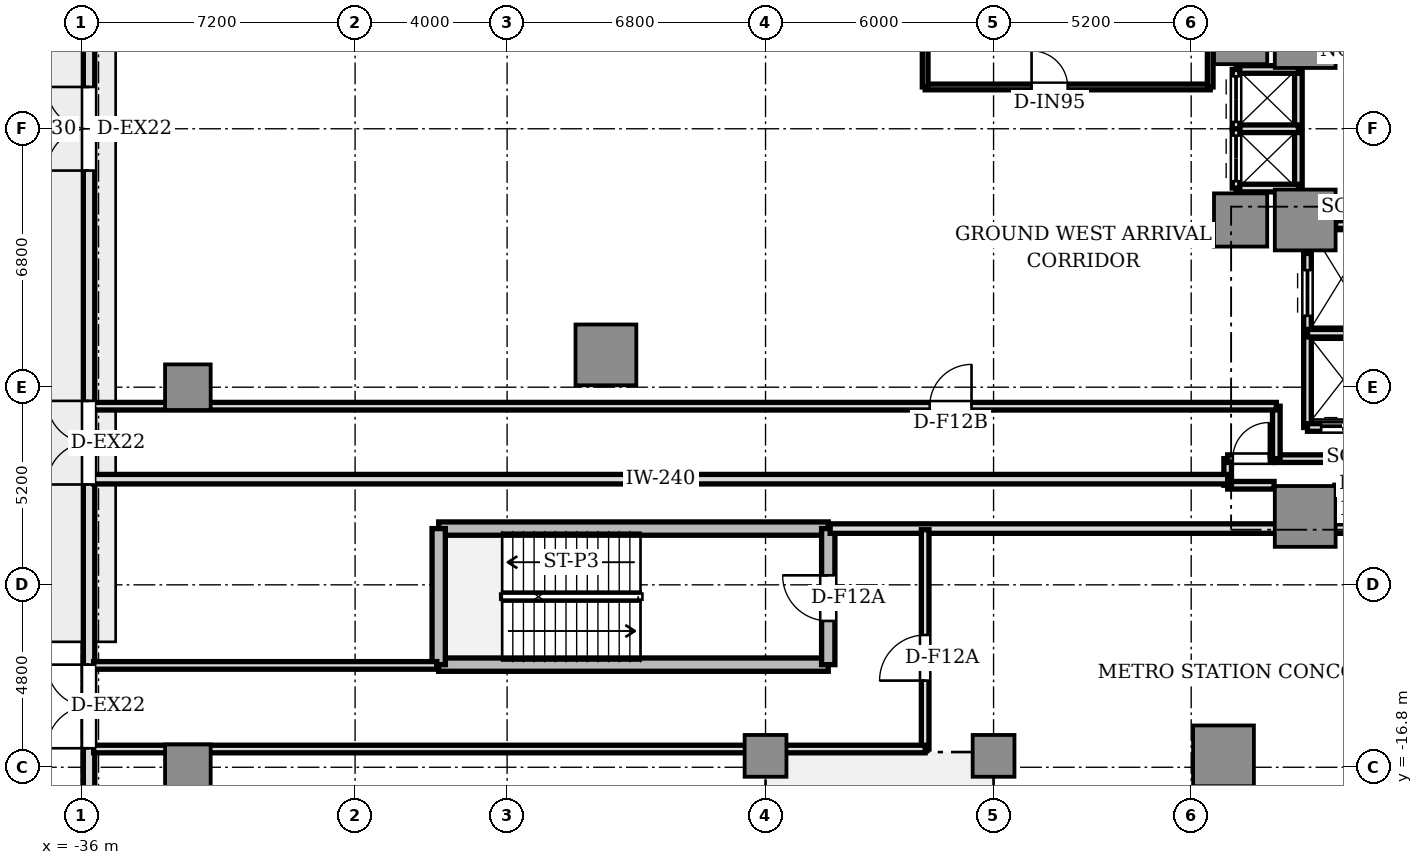
"""IFC4 building model, lengths in metres.
Left out: names, types, materials, properties, quantities, classifications, styles, units other than length and angle.
Written with IfcOpenShell. Run it as: python <this file> out.ifc"""

import sys

from ifc_helpers import new_model, si_unit, direction, frame, frame_2d, origin, origin_2d, place, context, subcontext, project, spatial, rectangle, circle, extrude, source, transform, mapped, element, fill, save


model = new_model("IFC4")
c1 = context("Model", 3, precision=1e-05, world=origin(), true_north=direction((0.0, 1.0)))
c2 = subcontext(c1, "Body", "Model", "MODEL_VIEW")
j1 = project(units=[si_unit("LENGTHUNIT", "METRE"), si_unit("PLANEANGLEUNIT", "RADIAN")], contexts=[c1])
p1 = place(None, origin())
s1 = spatial("IfcSite", under=j1, at=p1, CompositionType="ELEMENT")
p2 = place(p1, origin())
s2 = spatial("IfcBuilding", under=s1, at=p2, CompositionType="ELEMENT")
p3 = place(p2, origin())
s3 = spatial("IfcBuildingStorey", under=s2, at=p3, CompositionType="ELEMENT", Elevation=0.0)
p4 = place(p3, frame((-3.55, -10.2, 0.0), z_axis=(0.0, 0.0, 1.0), x_axis=(1.0, 0.0, 0.0)))
e1 = element("IfcWall", 1, at=p4, inside=s3, PredefinedType="SHEAR", context=c2, shape_type="SweptSolid", body=[
    extrude(rectangle(XDim=7.1, YDim=0.5, at=frame_2d((3.55, 0.0))), origin(), (0.0, 0.0, 1.0), 4.48),
])
m1 = source(origin(), c2, "Body", "SweptSolid", [
    extrude(rectangle(XDim=1.6, YDim=1.6, at=origin_2d()), origin(), (0.0, 0.0, 1.0), 4.48),
])
for number, where, z_axis, x_axis in (
    (2, (-3.8, 2.4, 0.0), (0.0, 0.0, 1.0), (1.0, 0.0, 0.0)),
    (3, (-3.8, -2.4, 0.0), (0.0, 0.0, 1.0), (1.0, 0.0, 0.0)),
    (4, (-3.8, -10.2, 0.0), (0.0, 0.0, 1.0), (1.0, 0.0, 0.0)),
):
    element("IfcColumn", number, at=place(p3, frame(where, z_axis=z_axis, x_axis=x_axis)), inside=s3, PredefinedType="COLUMN", context=c2, shape_type="MappedRepresentation", body=[
        mapped(m1, transform((0.0, 0.0, 0.0), scale=1.0)),
    ])
m2 = source(origin(), c2, "Body", "SweptSolid", [
    extrude(rectangle(XDim=1.4, YDim=1.4, at=origin_2d()), origin(), (0.0, 0.0, 1.0), 4.48),
])
for number, where, z_axis, x_axis in (
    (5, (-5.5, 2.4, 0.0), (0.0, 0.0, 1.0), (1.0, 0.0, 0.0)),
    (6, (-5.5, -2.4, 0.0), (0.0, 0.0, 1.0), (1.0, 0.0, 0.0)),
):
    element("IfcColumn", number, at=place(p3, frame(where, z_axis=z_axis, x_axis=x_axis)), inside=s3, PredefinedType="COLUMN", context=c2, shape_type="MappedRepresentation", body=[
        mapped(m2, transform((0.0, 0.0, 0.0), scale=1.0)),
    ])
for number, where, z_axis, x_axis in (
    (7, (-22.2, -5.95, 0.0), (0.0, 0.0, 1.0), (1.0, 0.0, 0.0)),
    (8, (-5.95, -16.5, 0.0), (0.0, 0.0, 1.0), (1.0, 0.0, 0.0)),
):
    element("IfcColumn", number, at=place(p3, frame(where, z_axis=z_axis, x_axis=x_axis)), inside=s3, PredefinedType="COLUMN", context=c2, shape_type="MappedRepresentation", body=[
        mapped(m1, transform((0.0, 0.0, 0.0), scale=1.0)),
    ])
m3 = source(origin(), c2, "Body", "SweptSolid", [
    extrude(rectangle(XDim=1.2, YDim=1.2, at=origin_2d()), origin(), (0.0, 0.0, 1.0), 4.48),
])
for number, where, z_axis, x_axis in (
    (9, (-33.2, -16.8, 0.0), (0.0, 0.0, 1.0), (1.0, 0.0, 0.0)),
    (10, (-33.2, -6.8, 0.0), (0.0, 0.0, 1.0), (1.0, 0.0, 0.0)),
):
    element("IfcColumn", number, at=place(p3, frame(where, z_axis=z_axis, x_axis=x_axis)), inside=s3, PredefinedType="COLUMN", context=c2, shape_type="MappedRepresentation", body=[
        mapped(m3, transform((0.0, 0.0, 0.0), scale=1.0)),
    ])
m4 = source(origin(), c2, "Body", "SweptSolid", [
    extrude(circle(Radius=0.55, at=origin_2d()), origin(), (0.0, 0.0, 1.0), 4.48),
])
for number, where, z_axis, x_axis in (
    (11, (-18.0, -16.5, 0.0), (0.0, 0.0, 1.0), (1.0, 0.0, 0.0)),
    (12, (-12.0, -16.5, 0.0), (0.0, 0.0, 1.0), (1.0, 0.0, 0.0)),
):
    element("IfcColumn", number, at=place(p3, frame(where, z_axis=z_axis, x_axis=x_axis)), inside=s3, PredefinedType="COLUMN", context=c2, shape_type="MappedRepresentation", body=[
        mapped(m4, transform((0.0, 0.0, 0.0), scale=1.0)),
    ])
p5 = place(p3, frame((-35.8, -22.6, 0.0), z_axis=(0.0, 0.0, 1.0), x_axis=(0.0, 1.0, 0.0)))
e13 = element("IfcWall", 13, at=p5, inside=s3, PredefinedType="STANDARD", context=c2, shape_type="SweptSolid", body=[
    extrude(rectangle(XDim=45.2, YDim=0.3, at=frame_2d((22.6, 0.0))), origin(), (0.0, 0.0, 1.0), 3.8),
])
p6 = place(p5, frame((6.3, 0.0, 0.0)))
e14 = element("IfcOpeningElement", 14, at=p6, cuts=e13, PredefinedType="OPENING", context=c2, shape_type="SweptSolid", body=[
    extrude(rectangle(XDim=2.2, YDim=2.4, at=frame_2d((1.1, 1.2))), frame((0.0, 0.16, 0.0), z_axis=(0.0, -1.0, 0.0), x_axis=(1.0, 0.0, 0.0)), (0.0, 0.0, 1.0), 0.32),
])
p7 = place(p5, frame((13.24, 0.0, 0.0)))
e15 = element("IfcOpeningElement", 15, at=p7, cuts=e13, PredefinedType="OPENING", context=c2, shape_type="SweptSolid", body=[
    extrude(rectangle(XDim=2.2, YDim=2.4, at=frame_2d((1.1, 1.2))), frame((0.0, 0.16, 0.0), z_axis=(0.0, -1.0, 0.0), x_axis=(1.0, 0.0, 0.0)), (0.0, 0.0, 1.0), 0.32),
])
p8 = place(p5, frame((21.5, 0.0, 0.0)))
e16 = element("IfcOpeningElement", 16, at=p8, cuts=e13, PredefinedType="OPENING", context=c2, shape_type="SweptSolid", body=[
    extrude(rectangle(XDim=2.2, YDim=2.4, at=frame_2d((1.1, 1.2))), frame((0.0, 0.16, 0.0), z_axis=(0.0, -1.0, 0.0), x_axis=(1.0, 0.0, 0.0)), (0.0, 0.0, 1.0), 0.32),
])
p9 = place(p5, frame((32.1, 0.0, 0.0)))
e17 = element("IfcOpeningElement", 17, at=p9, cuts=e13, PredefinedType="OPENING", context=c2, shape_type="SweptSolid", body=[
    extrude(rectangle(XDim=2.2, YDim=2.4, at=frame_2d((1.1, 1.2))), frame((0.0, 0.16, 0.0), z_axis=(0.0, -1.0, 0.0), x_axis=(1.0, 0.0, 0.0)), (0.0, 0.0, 1.0), 0.32),
])
p10 = place(p3, frame((-3.0, -2.52, 0.0), z_axis=(0.0, 0.0, 1.0), x_axis=(1.0, 0.0, 0.0)))
e18 = element("IfcWall", 18, at=p10, inside=s3, PredefinedType="SOLIDWALL", context=c2, shape_type="SweptSolid", body=[
    extrude(rectangle(XDim=1.0, YDim=0.2, at=frame_2d((0.5, 0.0))), origin(), (0.0, 0.0, 1.0), 4.03),
])
p11 = place(p3, frame((-3.74, -5.36, 0.0), z_axis=(0.0, 0.0, 1.0), x_axis=(0.0, 1.0, 0.0)))
e19 = element("IfcWall", 19, at=p11, inside=s3, PredefinedType="SOLIDWALL", context=c2, shape_type="SweptSolid", body=[
    extrude(rectangle(XDim=2.08, YDim=0.2, at=frame_2d((1.04, 0.0))), origin(), (0.0, 0.0, 1.0), 4.03),
])
p12 = place(p11, frame((0.44, 0.0, 0.0)))
e20 = element("IfcOpeningElement", 20, at=p12, cuts=e19, PredefinedType="OPENING", context=c2, shape_type="SweptSolid", body=[
    extrude(rectangle(XDim=1.2, YDim=2.2, at=frame_2d((0.6, 1.1))), frame((0.0, 0.11, 0.0), z_axis=(0.0, -1.0, 0.0), x_axis=(1.0, 0.0, 0.0)), (0.0, 0.0, 1.0), 0.22),
])
p13 = place(p3, frame((-3.74, -7.86, 0.0), z_axis=(0.0, 0.0, 1.0), x_axis=(0.0, 1.0, 0.0)))
e21 = element("IfcWall", 21, at=p13, inside=s3, PredefinedType="SOLIDWALL", context=c2, shape_type="SweptSolid", body=[
    extrude(rectangle(XDim=2.48, YDim=0.2, at=frame_2d((1.24, 0.0))), origin(), (0.0, 0.0, 1.0), 4.03),
])
p14 = place(p3, frame((-3.74, -7.86, 0.0), z_axis=(0.0, 0.0, 1.0), x_axis=(1.0, 0.0, 0.0)))
e22 = element("IfcWall", 22, at=p14, inside=s3, PredefinedType="SOLIDWALL", context=c2, shape_type="SweptSolid", body=[
    extrude(rectangle(XDim=1.84, YDim=0.2, at=frame_2d((0.92, 0.0))), origin(), (0.0, 0.0, 1.0), 4.03),
])
p15 = place(p14, frame((0.36, 0.0, 0.0)))
e23 = element("IfcOpeningElement", 23, at=p15, cuts=e22, PredefinedType="OPENING", context=c2, shape_type="SweptSolid", body=[
    extrude(rectangle(XDim=1.1, YDim=2.2, at=frame_2d((0.55, 1.1))), frame((0.0, 0.11, 0.0), z_axis=(0.0, -1.0, 0.0), x_axis=(1.0, 0.0, 0.0)), (0.0, 0.0, 1.0), 0.22),
])
p16 = place(p3, frame((-3.74, -5.38, 0.0), z_axis=(0.0, 0.0, 1.0), x_axis=(1.0, 0.0, 0.0)))
e24 = element("IfcWall", 24, at=p16, inside=s3, PredefinedType="SOLIDWALL", context=c2, shape_type="SweptSolid", body=[
    extrude(rectangle(XDim=3.69, YDim=0.2, at=frame_2d((1.845, 0.0))), origin(), (0.0, 0.0, 1.0), 4.03),
])
p17 = place(p3, frame((-3.98, -1.56, 0.0), z_axis=(0.0, 0.0, 1.0), x_axis=(0.0, 1.0, 0.0)))
e25 = element("IfcWall", 25, at=p17, inside=s3, PredefinedType="SOLIDWALL", context=c2, shape_type="SweptSolid", body=[
    extrude(rectangle(XDim=3.12, YDim=0.2, at=frame_2d((1.56, 0.0))), origin(), (0.0, 0.0, 1.0), 3.55),
])
for number, where, z_axis, x_axis in (
    (26, (-5.62, 1.56, 0.0), (0.0, 0.0, 1.0), (1.0, 0.0, 0.0)),
    (27, (-5.62, -1.56, 0.0), (0.0, 0.0, 1.0), (1.0, 0.0, 0.0)),
    (28, (-5.62, 0.0, 0.0), (0.0, 0.0, 1.0), (1.0, 0.0, 0.0)),
):
    element("IfcWall", number, at=place(p3, frame(where, z_axis=z_axis, x_axis=x_axis)), inside=s3, PredefinedType="SOLIDWALL", context=c2, shape_type="SweptSolid", body=[
        extrude(rectangle(XDim=1.64, YDim=0.2, at=frame_2d((0.82, 0.0))), origin(), (0.0, 0.0, 1.0), 4.03),
    ])
p18 = place(p3, frame((-5.62, 0.0, 0.0), z_axis=(0.0, 0.0, 1.0), x_axis=(0.0, 1.0, 0.0)))
e29 = element("IfcWall", 29, at=p18, inside=s3, PredefinedType="SOLIDWALL", context=c2, shape_type="SweptSolid", body=[
    extrude(rectangle(XDim=1.56, YDim=0.2, at=frame_2d((0.78, 0.0))), origin(), (0.0, 0.0, 1.0), 4.03),
])
p19 = place(p18, frame((0.18, 0.0, 0.0)))
e30 = element("IfcOpeningElement", 30, at=p19, cuts=e29, PredefinedType="OPENING", context=c2, shape_type="SweptSolid", body=[
    extrude(rectangle(XDim=1.2, YDim=2.2, at=frame_2d((0.6, 1.1))), frame((0.0, 0.11, 0.0), z_axis=(0.0, -1.0, 0.0), x_axis=(1.0, 0.0, 0.0)), (0.0, 0.0, 1.0), 0.22),
])
p20 = place(p3, frame((-5.62, -1.56, 0.0), z_axis=(0.0, 0.0, 1.0), x_axis=(0.0, 1.0, 0.0)))
e31 = element("IfcWall", 31, at=p20, inside=s3, PredefinedType="SOLIDWALL", context=c2, shape_type="SweptSolid", body=[
    extrude(rectangle(XDim=1.56, YDim=0.2, at=frame_2d((0.78, 0.0))), origin(), (0.0, 0.0, 1.0), 4.03),
])
p21 = place(p20, frame((0.18, 0.0, 0.0)))
e32 = element("IfcOpeningElement", 32, at=p21, cuts=e31, PredefinedType="OPENING", context=c2, shape_type="SweptSolid", body=[
    extrude(rectangle(XDim=1.2, YDim=2.2, at=frame_2d((0.6, 1.1))), frame((0.0, 0.11, 0.0), z_axis=(0.0, -1.0, 0.0), x_axis=(1.0, 0.0, 0.0)), (0.0, 0.0, 1.0), 0.22),
])
for number, where, z_axis, x_axis in (
    (33, (-26.6, -10.52, 0.0), (0.0, 0.0, 1.0), (1.0, 0.0, 0.0)),
    (34, (-26.6, -14.1, 0.0), (0.0, 0.0, 1.0), (1.0, 0.0, 0.0)),
):
    element("IfcWall", number, at=place(p3, frame(where, z_axis=z_axis, x_axis=x_axis)), inside=s3, PredefinedType="SHEAR", context=c2, shape_type="SweptSolid", body=[
        extrude(rectangle(XDim=10.25, YDim=0.35, at=frame_2d((5.125, 0.0))), origin(), (0.0, 0.0, 1.0), 4.48),
    ])
p22 = place(p3, frame((-26.6, -14.1, 0.0), z_axis=(0.0, 0.0, 1.0), x_axis=(0.0, 1.0, 0.0)))
e35 = element("IfcWall", 35, at=p22, inside=s3, PredefinedType="SHEAR", context=c2, shape_type="SweptSolid", body=[
    extrude(rectangle(XDim=3.58, YDim=0.35, at=frame_2d((1.79, 0.0))), origin(), (0.0, 0.0, 1.0), 4.48),
])
p23 = place(p3, frame((-16.35, -14.1, 0.0), z_axis=(0.0, 0.0, 1.0), x_axis=(0.0, 1.0, 0.0)))
e36 = element("IfcWall", 36, at=p23, inside=s3, PredefinedType="SHEAR", context=c2, shape_type="SweptSolid", body=[
    extrude(rectangle(XDim=3.58, YDim=0.35, at=frame_2d((1.79, 0.0))), origin(), (0.0, 0.0, 1.0), 4.48),
])
p24 = place(p23, frame((1.15, 0.0, 0.0)))
e37 = element("IfcOpeningElement", 37, at=p24, cuts=e36, PredefinedType="OPENING", context=c2, shape_type="SweptSolid", body=[
    extrude(rectangle(XDim=1.2, YDim=2.2, at=frame_2d((0.6, 1.1))), frame((0.0, 0.185, 0.0), z_axis=(0.0, -1.0, 0.0), x_axis=(1.0, 0.0, 0.0)), (0.0, 0.0, 1.0), 0.37),
])
p25 = place(p3, frame((-13.8, 1.1, 0.0), z_axis=(0.0, 0.0, 1.0), x_axis=(1.0, 0.0, 0.0)))
e38 = element("IfcWall", 38, at=p25, inside=s3, PredefinedType="PARTITIONING", context=c2, shape_type="SweptSolid", body=[
    extrude(rectangle(XDim=7.5, YDim=0.15, at=frame_2d((3.75, 0.0))), origin(), (0.0, 0.0, 1.0), 4.03),
])
p26 = place(p25, frame((2.8, 0.0, 0.0)))
e39 = element("IfcOpeningElement", 39, at=p26, cuts=e38, PredefinedType="OPENING", context=c2, shape_type="SweptSolid", body=[
    extrude(rectangle(XDim=0.95, YDim=2.15, at=frame_2d((0.475, 1.075))), frame((0.0, 0.085, 0.0), z_axis=(0.0, -1.0, 0.0), x_axis=(1.0, 0.0, 0.0)), (0.0, 0.0, 1.0), 0.17),
])
for number, where, z_axis, x_axis in (
    (40, (-13.8, 1.1, 0.0), (0.0, 0.0, 1.0), (0.0, 1.0, 0.0)),
    (41, (-6.3, 1.1, 0.0), (0.0, 0.0, 1.0), (0.0, 1.0, 0.0)),
):
    element("IfcWall", number, at=place(p3, frame(where, z_axis=z_axis, x_axis=x_axis)), inside=s3, PredefinedType="PARTITIONING", context=c2, shape_type="SweptSolid", body=[
        extrude(rectangle(XDim=7.6, YDim=0.15, at=frame_2d((3.8, 0.0))), origin(), (0.0, 0.0, 1.0), 4.03),
    ])
p27 = place(p3, frame((-4.62, -8.68, 0.0), z_axis=(0.0, 0.0, 1.0), x_axis=(1.0, 0.0, 0.0)))
e42 = element("IfcWall", 42, at=p27, inside=s3, PredefinedType="SOLIDWALL", context=c2, shape_type="SweptSolid", body=[
    extrude(rectangle(XDim=4.5, YDim=0.2, at=frame_2d((2.25, 0.0))), origin(), (0.0, 0.0, 1.0), 4.03),
])
p28 = place(p3, frame((-2.92, -10.02, 0.0), z_axis=(0.0, 0.0, 1.0), x_axis=(0.0, 1.0, 0.0)))
e43 = element("IfcWall", 43, at=p28, inside=s3, PredefinedType="SOLIDWALL", context=c2, shape_type="SweptSolid", body=[
    extrude(rectangle(XDim=0.64, YDim=0.2, at=frame_2d((0.32, 0.0))), origin(), (0.0, 0.0, 1.0), 4.03),
])
p29 = place(p3, frame((-5.84, -9.38, 0.0), z_axis=(0.0, 0.0, 1.0), x_axis=(1.0, 0.0, 0.0)))
e44 = element("IfcWall", 44, at=p29, inside=s3, PredefinedType="SOLIDWALL", context=c2, shape_type="SweptSolid", body=[
    extrude(rectangle(XDim=1.22, YDim=0.2, at=frame_2d((0.61, 0.0))), origin(), (0.0, 0.0, 1.0), 4.03),
])
p30 = place(p3, frame((-5.84, -9.38, 0.0), z_axis=(0.0, 0.0, 1.0), x_axis=(0.0, 1.0, 0.0)))
e45 = element("IfcWall", 45, at=p30, inside=s3, PredefinedType="SOLIDWALL", context=c2, shape_type="SweptSolid", body=[
    extrude(rectangle(XDim=0.7, YDim=0.2, at=frame_2d((0.35, 0.0))), origin(), (0.0, 0.0, 1.0), 4.03),
])
p31 = place(p3, frame((-5.84, -8.68, 0.0), z_axis=(0.0, 0.0, 1.0), x_axis=(1.0, 0.0, 0.0)))
e46 = element("IfcWall", 46, at=p31, inside=s3, PredefinedType="SOLIDWALL", context=c2, shape_type="SweptSolid", body=[
    extrude(rectangle(XDim=1.22, YDim=0.2, at=frame_2d((0.61, 0.0))), origin(), (0.0, 0.0, 1.0), 4.03),
])
p32 = place(p31, frame((0.135, 0.0, 0.0)))
e47 = element("IfcOpeningElement", 47, at=p32, cuts=e46, PredefinedType="OPENING", context=c2, shape_type="SweptSolid", body=[
    extrude(rectangle(XDim=0.95, YDim=2.15, at=frame_2d((0.475, 1.075))), frame((0.0, 0.11, 0.0), z_axis=(0.0, -1.0, 0.0), x_axis=(1.0, 0.0, 0.0)), (0.0, 0.0, 1.0), 0.22),
])
p33 = place(p3, frame((-4.56, -8.68, 0.0), z_axis=(0.0, 0.0, 1.0), x_axis=(0.0, 1.0, 0.0)))
e48 = element("IfcWall", 48, at=p33, inside=s3, PredefinedType="SOLIDWALL", context=c2, shape_type="SweptSolid", body=[
    extrude(rectangle(XDim=1.38, YDim=0.2, at=frame_2d((0.69, 0.0))), origin(), (0.0, 0.0, 1.0), 4.03),
])
p34 = place(p3, frame((-35.68, -7.3, 0.0), z_axis=(0.0, 0.0, 1.0), x_axis=(1.0, 0.0, 0.0)))
e49 = element("IfcWall", 49, at=p34, inside=s3, PredefinedType="SOLIDWALL", context=c2, shape_type="SweptSolid", body=[
    extrude(rectangle(XDim=31.12, YDim=0.2, at=frame_2d((15.56, 0.0))), origin(), (0.0, 0.0, 1.0), 3.95),
])
p35 = place(p34, frame((22.0, 0.0, 0.0)))
e50 = element("IfcOpeningElement", 50, at=p35, cuts=e49, PredefinedType="OPENING", context=c2, shape_type="SweptSolid", body=[
    extrude(rectangle(XDim=1.1, YDim=2.15, at=frame_2d((0.55, 1.075))), frame((0.0, 0.11, 0.0), z_axis=(0.0, -1.0, 0.0), x_axis=(1.0, 0.0, 0.0)), (0.0, 0.0, 1.0), 0.22),
])
p36 = place(p3, frame((-35.68, -9.22, 0.0), z_axis=(0.0, 0.0, 1.0), x_axis=(1.0, 0.0, 0.0)))
e51 = element("IfcWall", 51, at=p36, inside=s3, PredefinedType="SOLIDWALL", context=c2, shape_type="SweptSolid", body=[
    extrude(rectangle(XDim=29.84, YDim=0.25, at=frame_2d((14.92, 0.0))), origin(), (0.0, 0.0, 1.0), 3.95),
])
p37 = place(p3, frame((-16.3, -10.52, 0.0), z_axis=(0.0, 0.0, 1.0), x_axis=(1.0, 0.0, 0.0)))
e52 = element("IfcWall", 52, at=p37, inside=s3, PredefinedType="SOLIDWALL", context=c2, shape_type="SweptSolid", body=[
    extrude(rectangle(XDim=16.3, YDim=0.25, at=frame_2d((8.15, 0.0))), origin(), (0.0, 0.0, 1.0), 4.03),
])
p38 = place(p3, frame((-13.8, -16.32, 0.0), z_axis=(0.0, 0.0, 1.0), x_axis=(0.0, 1.0, 0.0)))
e53 = element("IfcWall", 53, at=p38, inside=s3, PredefinedType="SOLIDWALL", context=c2, shape_type="SweptSolid", body=[
    extrude(rectangle(XDim=5.77, YDim=0.2, at=frame_2d((2.885, 0.0))), origin(), (0.0, 0.0, 1.0), 4.03),
])
p39 = place(p38, frame((1.8, 0.0, 0.0)))
e54 = element("IfcOpeningElement", 54, at=p39, cuts=e53, PredefinedType="OPENING", context=c2, shape_type="SweptSolid", body=[
    extrude(rectangle(XDim=1.2, YDim=2.2, at=frame_2d((0.6, 1.1))), frame((0.0, 0.11, 0.0), z_axis=(0.0, -1.0, 0.0), x_axis=(1.0, 0.0, 0.0)), (0.0, 0.0, 1.0), 0.22),
])
p40 = place(p3, frame((-35.68, -16.32, 0.0), z_axis=(0.0, 0.0, 1.0), x_axis=(1.0, 0.0, 0.0)))
e55 = element("IfcWall", 55, at=p40, inside=s3, PredefinedType="SOLIDWALL", context=c2, shape_type="SweptSolid", body=[
    extrude(rectangle(XDim=21.88, YDim=0.2, at=frame_2d((10.94, 0.0))), origin(), (0.0, 0.0, 1.0), 3.9),
])
p41 = place(p3, frame((-35.68, -14.12, 0.0), z_axis=(0.0, 0.0, 1.0), x_axis=(1.0, 0.0, 0.0)))
e56 = element("IfcWall", 56, at=p41, inside=s3, PredefinedType="SOLIDWALL", context=c2, shape_type="SweptSolid", body=[
    extrude(rectangle(XDim=9.03, YDim=0.2, at=frame_2d((4.515, 0.0))), origin(), (0.0, 0.0, 1.0), 4.03),
])
m5 = source(origin(), c2, "Body", "SweptSolid", [
    extrude(rectangle(XDim=2.2, YDim=0.05, at=origin_2d()), origin(), (0.0, 0.0, 1.0), 2.4),
])
p42 = place(p6, frame((1.1, 0.0, 0.0)))
e57 = element("IfcDoor", 57, at=p42, inside=s3, OperationType="DOUBLE_DOOR_SINGLE_SWING", PredefinedType="DOOR", context=c2, shape_type="MappedRepresentation", body=[
    mapped(m5, transform((0.0, 0.0, 0.0), scale=1.0)),
])
fill(e14, e57)
p43 = place(p7, frame((1.1, 0.0, 0.0)))
e58 = element("IfcDoor", 58, at=p43, inside=s3, OperationType="DOUBLE_DOOR_SINGLE_SWING", PredefinedType="DOOR", context=c2, shape_type="MappedRepresentation", body=[
    mapped(m5, transform((0.0, 0.0, 0.0), scale=1.0)),
])
fill(e15, e58)
p44 = place(p8, frame((1.1, 0.0, 0.0)))
e59 = element("IfcDoor", 59, at=p44, inside=s3, OperationType="DOUBLE_DOOR_SINGLE_SWING", PredefinedType="DOOR", context=c2, shape_type="MappedRepresentation", body=[
    mapped(m5, transform((0.0, 0.0, 0.0), scale=1.0)),
])
fill(e16, e59)
m6 = source(origin(), c2, "Body", "SweptSolid", [
    extrude(rectangle(XDim=1.2, YDim=0.05, at=origin_2d()), origin(), (0.0, 0.0, 1.0), 2.2),
])
p45 = place(p12, frame((0.6, 0.0, 0.0)))
e60 = element("IfcDoor", 60, at=p45, inside=s3, OperationType="DOUBLE_DOOR_SLIDING", PredefinedType="DOOR", context=c2, shape_type="MappedRepresentation", body=[
    mapped(m6, transform((0.0, 0.0, 0.0), scale=1.0)),
])
fill(e20, e60)
m7 = source(origin(), c2, "Body", "SweptSolid", [
    extrude(rectangle(XDim=1.1, YDim=0.05, at=origin_2d()), origin(), (0.0, 0.0, 1.0), 2.2),
])
p46 = place(p15, frame((0.55, 0.0, 0.0)))
e61 = element("IfcDoor", 61, at=p46, inside=s3, OperationType="DOUBLE_DOOR_SLIDING", PredefinedType="DOOR", context=c2, shape_type="MappedRepresentation", body=[
    mapped(m7, transform((0.0, 0.0, 0.0), scale=1.0)),
])
fill(e23, e61)
p47 = place(p19, frame((0.6, 0.0, 0.0)))
e62 = element("IfcDoor", 62, at=p47, inside=s3, OperationType="DOUBLE_DOOR_SLIDING", PredefinedType="DOOR", context=c2, shape_type="MappedRepresentation", body=[
    mapped(m6, transform((0.0, 0.0, 0.0), scale=1.0)),
])
fill(e30, e62)
p48 = place(p21, frame((0.6, 0.0, 0.0)))
e63 = element("IfcDoor", 63, at=p48, inside=s3, OperationType="DOUBLE_DOOR_SLIDING", PredefinedType="DOOR", context=c2, shape_type="MappedRepresentation", body=[
    mapped(m6, transform((0.0, 0.0, 0.0), scale=1.0)),
])
fill(e32, e63)
p49 = place(p24, frame((0.6, 0.0, 0.0)))
e64 = element("IfcDoor", 64, at=p49, inside=s3, OperationType="SINGLE_SWING_RIGHT", PredefinedType="DOOR", context=c2, shape_type="MappedRepresentation", body=[
    mapped(m6, transform((0.0, 0.0, 0.0), scale=1.0)),
])
fill(e37, e64)
m8 = source(origin(), c2, "Body", "SweptSolid", [
    extrude(rectangle(XDim=0.95, YDim=0.05, at=origin_2d()), origin(), (0.0, 0.0, 1.0), 2.15),
])
p50 = place(p26, frame((0.475, 0.0, 0.0)))
e65 = element("IfcDoor", 65, at=p50, inside=s3, OperationType="SINGLE_SWING_LEFT", PredefinedType="DOOR", context=c2, shape_type="MappedRepresentation", body=[
    mapped(m8, transform((0.0, 0.0, 0.0), scale=1.0)),
])
fill(e39, e65)
p51 = place(p32, frame((0.475, 0.0, 0.0)))
e66 = element("IfcDoor", 66, at=p51, inside=s3, OperationType="SINGLE_SWING_RIGHT", PredefinedType="DOOR", context=c2, shape_type="MappedRepresentation", body=[
    mapped(m8, transform((0.0, 0.0, 0.0), scale=1.0)),
])
fill(e47, e66)
m9 = source(origin(), c2, "Body", "SweptSolid", [
    extrude(rectangle(XDim=1.1, YDim=0.05, at=origin_2d()), origin(), (0.0, 0.0, 1.0), 2.15),
])
p52 = place(p35, frame((0.55, 0.0, 0.0)))
e67 = element("IfcDoor", 67, at=p52, inside=s3, OperationType="SINGLE_SWING_RIGHT", PredefinedType="DOOR", context=c2, shape_type="MappedRepresentation", body=[
    mapped(m9, transform((0.0, 0.0, 0.0), scale=1.0)),
])
fill(e50, e67)
p53 = place(p39, frame((0.6, 0.0, 0.0)))
e68 = element("IfcDoor", 68, at=p53, inside=s3, OperationType="SINGLE_SWING_LEFT", PredefinedType="DOOR", context=c2, shape_type="MappedRepresentation", body=[
    mapped(m6, transform((0.0, 0.0, 0.0), scale=1.0)),
])
fill(e54, e68)
save(model, sys.argv[1])
